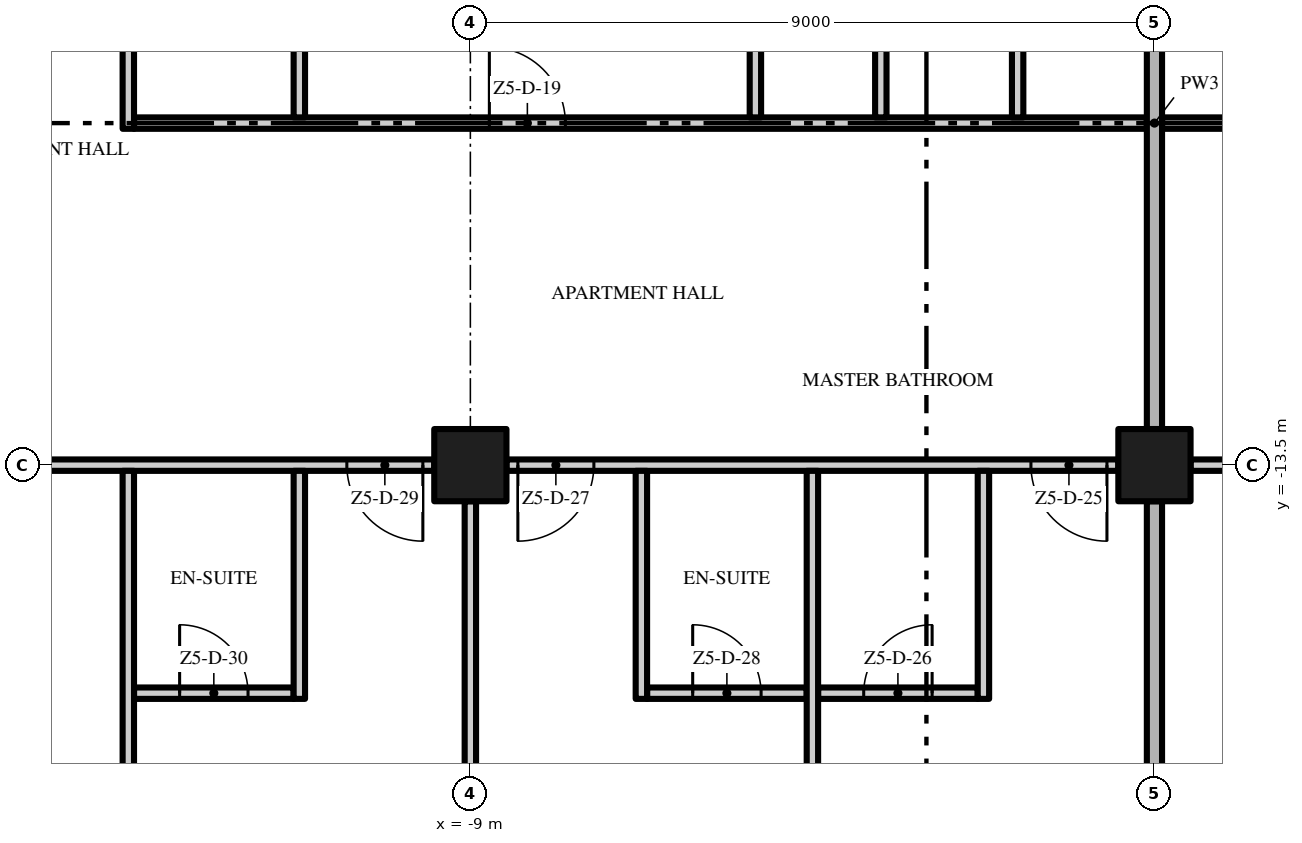
"""IFC4 building model, lengths in metres.
Left out: names, types, materials, properties, quantities, classifications, styles, units other than length and angle.
Written with IfcOpenShell. Run it as: python <this file> out.ifc"""

import sys

from ifc_helpers import new_model, si_unit, direction, frame, frame_2d, origin, origin_2d, place, context, subcontext, project, spatial, rectangle, extrude, element, fill, save


model = new_model("IFC4")
c1 = context("Model", 3, precision=1e-05, world=origin(), true_north=direction((0.0, 1.0)))
c2 = subcontext(c1, "Body", "Model", "MODEL_VIEW")
j1 = project(units=[si_unit("LENGTHUNIT", "METRE"), si_unit("PLANEANGLEUNIT", "RADIAN")], contexts=[c1])
p1 = place(None, origin())
s1 = spatial("IfcSite", under=j1, at=p1, CompositionType="ELEMENT")
p2 = place(p1, origin())
s2 = spatial("IfcBuilding", under=s1, at=p2, CompositionType="ELEMENT")
p3 = place(p2, frame((0.0, 0.0, 273.0)))
s3 = spatial("IfcBuildingStorey", under=s2, at=p3, CompositionType="ELEMENT", Elevation=273.0)
for number, where, z_axis, x_axis in (
    (1, (-9.0, -13.5, 0.0), (0.0, 0.0, 1.0), (1.0, 0.0, 0.0)),
    (2, (0.0, -13.5, 0.0), (0.0, 0.0, 1.0), (1.0, 0.0, 0.0)),
):
    element("IfcColumn", number, at=place(p3, frame(where, z_axis=z_axis, x_axis=x_axis)), inside=s3, PredefinedType="COLUMN", context=c2, shape_type="SweptSolid", body=[
        extrude(rectangle(XDim=0.95, YDim=0.95, at=origin_2d()), origin(), (0.0, 0.0, 1.0), 3.5),
    ])
p4 = place(p3, frame((-13.425, -16.5, 0.0), z_axis=(0.0, 0.0, 1.0), x_axis=(1.0, 0.0, 0.0)))
e3 = element("IfcWall", 3, at=p4, inside=s3, PredefinedType="PARTITIONING", context=c2, shape_type="SweptSolid", body=[
    extrude(rectangle(XDim=2.1, YDim=0.15, at=frame_2d((1.05, 0.0))), origin(), (0.0, 0.0, 1.0), 3.5),
])
p5 = place(p4, frame((0.6, 0.0, 0.0)))
e4 = element("IfcOpeningElement", 4, at=p5, cuts=e3, PredefinedType="OPENING", context=c2, shape_type="SweptSolid", body=[
    extrude(rectangle(XDim=0.9, YDim=2.1, at=frame_2d((0.45, 1.05))), frame((0.0, 0.085, 0.0), z_axis=(0.0, -1.0, 0.0), x_axis=(1.0, 0.0, 0.0)), (0.0, 0.0, 1.0), 0.17),
])
p6 = place(p3, frame((-6.675, -16.5, 0.0), z_axis=(0.0, 0.0, 1.0), x_axis=(1.0, 0.0, 0.0)))
e5 = element("IfcWall", 5, at=p6, inside=s3, PredefinedType="PARTITIONING", context=c2, shape_type="SweptSolid", body=[
    extrude(rectangle(XDim=2.1, YDim=0.15, at=frame_2d((1.05, 0.0))), origin(), (0.0, 0.0, 1.0), 3.5),
])
p7 = place(p6, frame((0.6, 0.0, 0.0)))
e6 = element("IfcOpeningElement", 6, at=p7, cuts=e5, PredefinedType="OPENING", context=c2, shape_type="SweptSolid", body=[
    extrude(rectangle(XDim=0.9, YDim=2.1, at=frame_2d((0.45, 1.05))), frame((0.0, 0.085, 0.0), z_axis=(0.0, -1.0, 0.0), x_axis=(1.0, 0.0, 0.0)), (0.0, 0.0, 1.0), 0.17),
])
p8 = place(p3, frame((-4.425, -16.5, 0.0), z_axis=(0.0, 0.0, 1.0), x_axis=(1.0, 0.0, 0.0)))
e7 = element("IfcWall", 7, at=p8, inside=s3, PredefinedType="PARTITIONING", context=c2, shape_type="SweptSolid", body=[
    extrude(rectangle(XDim=2.1, YDim=0.15, at=frame_2d((1.05, 0.0))), origin(), (0.0, 0.0, 1.0), 3.5),
])
p9 = place(p8, frame((0.6, 0.0, 0.0)))
e8 = element("IfcOpeningElement", 8, at=p9, cuts=e7, PredefinedType="OPENING", context=c2, shape_type="SweptSolid", body=[
    extrude(rectangle(XDim=0.9, YDim=2.1, at=frame_2d((0.45, 1.05))), frame((0.0, 0.085, 0.0), z_axis=(0.0, -1.0, 0.0), x_axis=(1.0, 0.0, 0.0)), (0.0, 0.0, 1.0), 0.17),
])
p10 = place(p3, frame((-9.475, -13.5, 0.0), z_axis=(0.0, 0.0, 1.0), x_axis=(-1.0, 0.0, 0.0)))
e9 = element("IfcWall", 9, at=p10, inside=s3, PredefinedType="PARTITIONING", context=c2, shape_type="SweptSolid", body=[
    extrude(rectangle(XDim=8.05, YDim=0.15, at=frame_2d((4.025, 0.0))), origin(), (0.0, 0.0, 1.0), 3.5),
])
p11 = place(p10, frame((0.15, 0.0, 0.0)))
e10 = element("IfcOpeningElement", 10, at=p11, cuts=e9, PredefinedType="OPENING", context=c2, shape_type="SweptSolid", body=[
    extrude(rectangle(XDim=1.0, YDim=2.4, at=frame_2d((0.5, 1.2))), frame((0.0, 0.085, 0.0), z_axis=(0.0, -1.0, 0.0), x_axis=(1.0, 0.0, 0.0)), (0.0, 0.0, 1.0), 0.17),
])
p12 = place(p10, frame((5.8, 0.0, 0.0)))
e11 = element("IfcOpeningElement", 11, at=p12, cuts=e9, PredefinedType="OPENING", context=c2, shape_type="SweptSolid", body=[
    extrude(rectangle(XDim=1.0, YDim=2.4, at=frame_2d((0.5, 1.2))), frame((0.0, 0.085, 0.0), z_axis=(0.0, -1.0, 0.0), x_axis=(1.0, 0.0, 0.0)), (0.0, 0.0, 1.0), 0.17),
])
p13 = place(p3, frame((-0.475, -13.5, 0.0), z_axis=(0.0, 0.0, 1.0), x_axis=(-1.0, 0.0, 0.0)))
e12 = element("IfcWall", 12, at=p13, inside=s3, PredefinedType="PARTITIONING", context=c2, shape_type="SweptSolid", body=[
    extrude(rectangle(XDim=8.05, YDim=0.15, at=frame_2d((4.025, 0.0))), origin(), (0.0, 0.0, 1.0), 3.5),
])
p14 = place(p13, frame((0.15, 0.0, 0.0)))
e13 = element("IfcOpeningElement", 13, at=p14, cuts=e12, PredefinedType="OPENING", context=c2, shape_type="SweptSolid", body=[
    extrude(rectangle(XDim=1.0, YDim=2.4, at=frame_2d((0.5, 1.2))), frame((0.0, 0.085, 0.0), z_axis=(0.0, -1.0, 0.0), x_axis=(1.0, 0.0, 0.0)), (0.0, 0.0, 1.0), 0.17),
])
p15 = place(p13, frame((6.9, 0.0, 0.0)))
e14 = element("IfcOpeningElement", 14, at=p15, cuts=e12, PredefinedType="OPENING", context=c2, shape_type="SweptSolid", body=[
    extrude(rectangle(XDim=1.0, YDim=2.4, at=frame_2d((0.5, 1.2))), frame((0.0, 0.085, 0.0), z_axis=(0.0, -1.0, 0.0), x_axis=(1.0, 0.0, 0.0)), (0.0, 0.0, 1.0), 0.17),
])
p16 = place(p3, frame((8.525, -13.5, 0.0), z_axis=(0.0, 0.0, 1.0), x_axis=(-1.0, 0.0, 0.0)))
e15 = element("IfcWall", 15, at=p16, inside=s3, PredefinedType="PARTITIONING", context=c2, shape_type="SweptSolid", body=[
    extrude(rectangle(XDim=8.05, YDim=0.15, at=frame_2d((4.025, 0.0))), origin(), (0.0, 0.0, 1.0), 3.5),
])
p17 = place(p16, frame((0.15, 0.0, 0.0)))
e16 = element("IfcOpeningElement", 16, at=p17, cuts=e15, PredefinedType="OPENING", context=c2, shape_type="SweptSolid", body=[
    extrude(rectangle(XDim=1.0, YDim=2.4, at=frame_2d((0.5, 1.2))), frame((0.0, 0.085, 0.0), z_axis=(0.0, -1.0, 0.0), x_axis=(1.0, 0.0, 0.0)), (0.0, 0.0, 1.0), 0.17),
])
p18 = place(p16, frame((5.8, 0.0, 0.0)))
e17 = element("IfcOpeningElement", 17, at=p18, cuts=e15, PredefinedType="OPENING", context=c2, shape_type="SweptSolid", body=[
    extrude(rectangle(XDim=1.0, YDim=2.4, at=frame_2d((0.5, 1.2))), frame((0.0, 0.085, 0.0), z_axis=(0.0, -1.0, 0.0), x_axis=(1.0, 0.0, 0.0)), (0.0, 0.0, 1.0), 0.17),
])
p19 = place(p3, frame((-13.425, -9.0, 0.0), z_axis=(0.0, 0.0, 1.0), x_axis=(1.0, 0.0, 0.0)))
e18 = element("IfcWall", 18, at=p19, inside=s3, PredefinedType="PARTITIONING", context=c2, shape_type="SweptSolid", body=[
    extrude(rectangle(XDim=13.325, YDim=0.15, at=frame_2d((6.662, 0.0))), origin(), (0.0, 0.0, 1.0), 3.5),
])
p20 = place(p19, frame((4.675, 0.0, 0.0)))
e19 = element("IfcOpeningElement", 19, at=p20, cuts=e18, PredefinedType="OPENING", context=c2, shape_type="SweptSolid", body=[
    extrude(rectangle(XDim=1.0, YDim=2.4, at=frame_2d((0.5, 1.2))), frame((0.0, 0.085, 0.0), z_axis=(0.0, -1.0, 0.0), x_axis=(1.0, 0.0, 0.0)), (0.0, 0.0, 1.0), 0.17),
])
p21 = place(p3, frame((0.1, -9.0, 0.0), z_axis=(0.0, 0.0, 1.0), x_axis=(1.0, 0.0, 0.0)))
e20 = element("IfcWall", 20, at=p21, inside=s3, PredefinedType="PARTITIONING", context=c2, shape_type="SweptSolid", body=[
    extrude(rectangle(XDim=13.4, YDim=0.15, at=frame_2d((6.7, 0.0))), origin(), (0.0, 0.0, 1.0), 3.5),
])
p22 = place(p21, frame((11.2, 0.0, 0.0)))
e21 = element("IfcOpeningElement", 21, at=p22, cuts=e20, PredefinedType="OPENING", context=c2, shape_type="SweptSolid", body=[
    extrude(rectangle(XDim=0.8, YDim=2.0, at=frame_2d((0.4, 1.0))), frame((0.0, 0.085, 0.0), z_axis=(0.0, -1.0, 0.0), x_axis=(1.0, 0.0, 0.0)), (0.0, 0.0, 1.0), 0.17),
])
p23 = place(p21, frame((8.55, 0.0, 0.0)))
e22 = element("IfcOpeningElement", 22, at=p23, cuts=e20, PredefinedType="OPENING", context=c2, shape_type="SweptSolid", body=[
    extrude(rectangle(XDim=0.8, YDim=2.0, at=frame_2d((0.4, 1.0))), frame((0.0, 0.085, 0.0), z_axis=(0.0, -1.0, 0.0), x_axis=(1.0, 0.0, 0.0)), (0.0, 0.0, 1.0), 0.17),
])
p24 = place(p21, frame((5.8, 0.0, 0.0)))
e23 = element("IfcOpeningElement", 23, at=p24, cuts=e20, PredefinedType="OPENING", context=c2, shape_type="SweptSolid", body=[
    extrude(rectangle(XDim=0.8, YDim=2.0, at=frame_2d((0.4, 1.0))), frame((0.0, 0.085, 0.0), z_axis=(0.0, -1.0, 0.0), x_axis=(1.0, 0.0, 0.0)), (0.0, 0.0, 1.0), 0.17),
])
p25 = place(p3, frame((-13.5, -22.2, 0.0), z_axis=(0.0, 0.0, 1.0), x_axis=(0.0, 1.0, 0.0)))
e24 = element("IfcWall", 24, at=p25, inside=s3, PredefinedType="PARTITIONING", context=c2, shape_type="SweptSolid", body=[
    extrude(rectangle(XDim=8.625, YDim=0.15, at=frame_2d((4.312, 0.0))), origin(), (0.0, 0.0, 1.0), 3.5),
])
p26 = place(p3, frame((-13.5, -4.425, 0.0), z_axis=(0.0, 0.0, 1.0), x_axis=(0.0, -1.0, 0.0)))
e25 = element("IfcWall", 25, at=p26, inside=s3, PredefinedType="PARTITIONING", context=c2, shape_type="SweptSolid", body=[
    extrude(rectangle(XDim=4.65, YDim=0.15, at=frame_2d((2.325, 0.0))), origin(), (0.0, 0.0, 1.0), 3.5),
])
p27 = place(p26, frame((1.875, 0.0, 0.0)))
e26 = element("IfcOpeningElement", 26, at=p27, cuts=e25, PredefinedType="OPENING", context=c2, shape_type="SweptSolid", body=[
    extrude(rectangle(XDim=0.9, YDim=2.1, at=frame_2d((0.45, 1.05))), frame((0.0, 0.085, 0.0), z_axis=(0.0, -1.0, 0.0), x_axis=(1.0, 0.0, 0.0)), (0.0, 0.0, 1.0), 0.17),
])
p28 = place(p3, frame((-11.25, -16.575, 0.0), z_axis=(0.0, 0.0, 1.0), x_axis=(0.0, 1.0, 0.0)))
e27 = element("IfcWall", 27, at=p28, inside=s3, PredefinedType="PARTITIONING", context=c2, shape_type="SweptSolid", body=[
    extrude(rectangle(XDim=3.0, YDim=0.15, at=frame_2d((1.5, 0.0))), origin(), (0.0, 0.0, 1.0), 3.5),
])
p29 = place(p3, frame((-11.25, -8.925, 0.0), z_axis=(0.0, 0.0, 1.0), x_axis=(0.0, 1.0, 0.0)))
e28 = element("IfcWall", 28, at=p29, inside=s3, PredefinedType="PARTITIONING", context=c2, shape_type="SweptSolid", body=[
    extrude(rectangle(XDim=4.35, YDim=0.15, at=frame_2d((2.175, 0.0))), origin(), (0.0, 0.0, 1.0), 3.5),
])
p30 = place(p3, frame((-9.0, -21.6, 0.0), z_axis=(0.0, 0.0, 1.0), x_axis=(0.0, 1.0, 0.0)))
e29 = element("IfcWall", 29, at=p30, inside=s3, PredefinedType="PARTITIONING", context=c2, shape_type="SweptSolid", body=[
    extrude(rectangle(XDim=7.625, YDim=0.15, at=frame_2d((3.812, 0.0))), origin(), (0.0, 0.0, 1.0), 3.5),
])
p31 = place(p3, frame((-6.75, -16.575, 0.0), z_axis=(0.0, 0.0, 1.0), x_axis=(0.0, 1.0, 0.0)))
e30 = element("IfcWall", 30, at=p31, inside=s3, PredefinedType="PARTITIONING", context=c2, shape_type="SweptSolid", body=[
    extrude(rectangle(XDim=3.0, YDim=0.15, at=frame_2d((1.5, 0.0))), origin(), (0.0, 0.0, 1.0), 3.5),
])
p32 = place(p3, frame((-5.25, -8.925, 0.0), z_axis=(0.0, 0.0, 1.0), x_axis=(0.0, 1.0, 0.0)))
e31 = element("IfcWall", 31, at=p32, inside=s3, PredefinedType="PARTITIONING", context=c2, shape_type="SweptSolid", body=[
    extrude(rectangle(XDim=4.35, YDim=0.15, at=frame_2d((2.175, 0.0))), origin(), (0.0, 0.0, 1.0), 3.5),
])
p33 = place(p3, frame((-4.5, -22.2, 0.0), z_axis=(0.0, 0.0, 1.0), x_axis=(0.0, 1.0, 0.0)))
e32 = element("IfcWall", 32, at=p33, inside=s3, PredefinedType="PARTITIONING", context=c2, shape_type="SweptSolid", body=[
    extrude(rectangle(XDim=8.625, YDim=0.15, at=frame_2d((4.312, 0.0))), origin(), (0.0, 0.0, 1.0), 3.5),
])
p34 = place(p3, frame((-3.6, -8.925, 0.0), z_axis=(0.0, 0.0, 1.0), x_axis=(0.0, 1.0, 0.0)))
e33 = element("IfcWall", 33, at=p34, inside=s3, PredefinedType="PARTITIONING", context=c2, shape_type="SweptSolid", body=[
    extrude(rectangle(XDim=4.35, YDim=0.15, at=frame_2d((2.175, 0.0))), origin(), (0.0, 0.0, 1.0), 3.5),
])
p35 = place(p3, frame((-2.25, -16.575, 0.0), z_axis=(0.0, 0.0, 1.0), x_axis=(0.0, 1.0, 0.0)))
e34 = element("IfcWall", 34, at=p35, inside=s3, PredefinedType="PARTITIONING", context=c2, shape_type="SweptSolid", body=[
    extrude(rectangle(XDim=3.0, YDim=0.15, at=frame_2d((1.5, 0.0))), origin(), (0.0, 0.0, 1.0), 3.5),
])
p36 = place(p3, frame((-1.8, -8.925, 0.0), z_axis=(0.0, 0.0, 1.0), x_axis=(0.0, 1.0, 0.0)))
e35 = element("IfcWall", 35, at=p36, inside=s3, PredefinedType="PARTITIONING", context=c2, shape_type="SweptSolid", body=[
    extrude(rectangle(XDim=4.35, YDim=0.15, at=frame_2d((2.175, 0.0))), origin(), (0.0, 0.0, 1.0), 3.5),
])
p37 = place(p3, frame((0.0, -21.6, 0.0), z_axis=(0.0, 0.0, 1.0), x_axis=(0.0, 1.0, 0.0)))
e36 = element("IfcWall", 36, at=p37, inside=s3, PredefinedType="PARTITIONING", context=c2, shape_type="SweptSolid", body=[
    extrude(rectangle(XDim=7.625, YDim=0.2, at=frame_2d((3.812, 0.0))), origin(), (0.0, 0.0, 1.0), 3.5),
])
p38 = place(p3, frame((0.0, -13.025, 0.0), z_axis=(0.0, 0.0, 1.0), x_axis=(0.0, 1.0, 0.0)))
e37 = element("IfcWall", 37, at=p38, inside=s3, PredefinedType="PARTITIONING", context=c2, shape_type="SweptSolid", body=[
    extrude(rectangle(XDim=8.05, YDim=0.2, at=frame_2d((4.025, 0.0))), origin(), (0.0, 0.0, 1.0), 3.5),
])
p39 = place(p20, origin())
e38 = element("IfcDoor", 38, at=p39, inside=s3, OperationType="SINGLE_SWING_LEFT", PredefinedType="DOOR", context=c2, shape_type="SweptSolid", body=[
    extrude(rectangle(XDim=1.0, YDim=2.4, at=frame_2d((0.5, 1.2))), frame((0.0, 0.025, 0.0), z_axis=(0.0, -1.0, 0.0), x_axis=(1.0, 0.0, 0.0)), (0.0, 0.0, 1.0), 0.05),
])
fill(e19, e38)
p40 = place(p14, origin())
e39 = element("IfcDoor", 39, at=p40, inside=s3, OperationType="SINGLE_SWING_LEFT", PredefinedType="DOOR", context=c2, shape_type="SweptSolid", body=[
    extrude(rectangle(XDim=1.0, YDim=2.4, at=frame_2d((0.5, 1.2))), frame((0.0, 0.025, 0.0), z_axis=(0.0, -1.0, 0.0), x_axis=(1.0, 0.0, 0.0)), (0.0, 0.0, 1.0), 0.05),
])
fill(e13, e39)
p41 = place(p9, origin())
e40 = element("IfcDoor", 40, at=p41, inside=s3, OperationType="SINGLE_SWING_RIGHT", PredefinedType="DOOR", context=c2, shape_type="SweptSolid", body=[
    extrude(rectangle(XDim=0.9, YDim=2.1, at=frame_2d((0.45, 1.05))), frame((0.0, 0.025, 0.0), z_axis=(0.0, -1.0, 0.0), x_axis=(1.0, 0.0, 0.0)), (0.0, 0.0, 1.0), 0.05),
])
fill(e8, e40)
p42 = place(p15, origin())
e41 = element("IfcDoor", 41, at=p42, inside=s3, OperationType="SINGLE_SWING_RIGHT", PredefinedType="DOOR", context=c2, shape_type="SweptSolid", body=[
    extrude(rectangle(XDim=1.0, YDim=2.4, at=frame_2d((0.5, 1.2))), frame((0.0, 0.025, 0.0), z_axis=(0.0, -1.0, 0.0), x_axis=(1.0, 0.0, 0.0)), (0.0, 0.0, 1.0), 0.05),
])
fill(e14, e41)
p43 = place(p7, origin())
e42 = element("IfcDoor", 42, at=p43, inside=s3, OperationType="SINGLE_SWING_LEFT", PredefinedType="DOOR", context=c2, shape_type="SweptSolid", body=[
    extrude(rectangle(XDim=0.9, YDim=2.1, at=frame_2d((0.45, 1.05))), frame((0.0, 0.025, 0.0), z_axis=(0.0, -1.0, 0.0), x_axis=(1.0, 0.0, 0.0)), (0.0, 0.0, 1.0), 0.05),
])
fill(e6, e42)
p44 = place(p11, origin())
e43 = element("IfcDoor", 43, at=p44, inside=s3, OperationType="SINGLE_SWING_LEFT", PredefinedType="DOOR", context=c2, shape_type="SweptSolid", body=[
    extrude(rectangle(XDim=1.0, YDim=2.4, at=frame_2d((0.5, 1.2))), frame((0.0, 0.025, 0.0), z_axis=(0.0, -1.0, 0.0), x_axis=(1.0, 0.0, 0.0)), (0.0, 0.0, 1.0), 0.05),
])
fill(e10, e43)
p45 = place(p5, origin())
e44 = element("IfcDoor", 44, at=p45, inside=s3, OperationType="SINGLE_SWING_LEFT", PredefinedType="DOOR", context=c2, shape_type="SweptSolid", body=[
    extrude(rectangle(XDim=0.9, YDim=2.1, at=frame_2d((0.45, 1.05))), frame((0.0, 0.025, 0.0), z_axis=(0.0, -1.0, 0.0), x_axis=(1.0, 0.0, 0.0)), (0.0, 0.0, 1.0), 0.05),
])
fill(e4, e44)
save(model, sys.argv[1])
